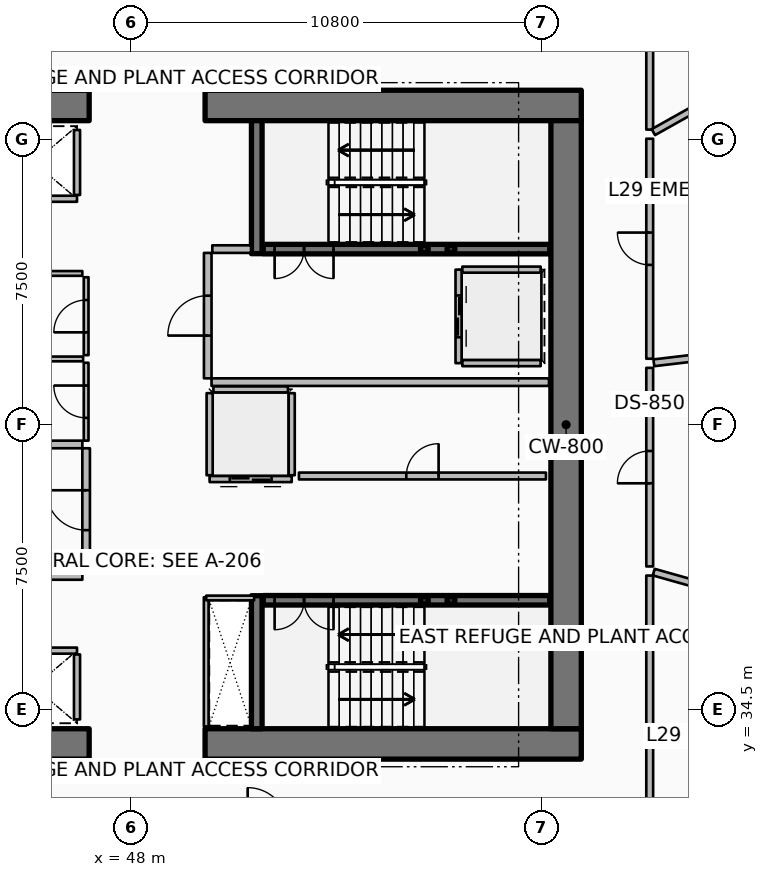
"""IFC4 building model, lengths in metres.
Left out: names, types, materials, properties, quantities, classifications, styles, units other than length and angle.
Written with IfcOpenShell. Run it as: python <this file> out.ifc"""

import sys

from ifc_helpers import new_model, si_unit, direction, frame, frame_2d, origin, origin_2d, place, context, subcontext, project, spatial, rectangle, hollow_rectangle, extrude, element, fill, save


model = new_model("IFC4")
c1 = context("Model", 3, precision=1e-05, world=origin(), true_north=direction((0.0, 1.0)))
c2 = subcontext(c1, "Body", "Model", "MODEL_VIEW")
j1 = project(units=[si_unit("LENGTHUNIT", "METRE"), si_unit("PLANEANGLEUNIT", "RADIAN")], contexts=[c1])
p1 = place(None, origin())
s1 = spatial("IfcSite", under=j1, at=p1, CompositionType="ELEMENT")
p2 = place(p1, origin())
s2 = spatial("IfcBuilding", under=s1, at=p2, CompositionType="ELEMENT")
p3 = place(p2, frame((0.0, 0.0, 116.4)))
s3 = spatial("IfcBuildingStorey", under=s2, at=p3, CompositionType="ELEMENT", Elevation=116.4)
p4 = place(p3, frame((37.0, 33.6, 0.0), z_axis=(0.0, 0.0, 1.0), x_axis=(1.0, 0.0, 0.0)))
e1 = element("IfcWall", 1, at=p4, inside=s3, PredefinedType="SHEAR", context=c2, shape_type="SweptSolid", body=[
    extrude(rectangle(XDim=9.9, YDim=0.8, at=frame_2d((4.95, 0.0))), origin(), (0.0, 0.0, 1.0), 6.6),
])
p5 = place(p3, frame((49.95, 33.6, 0.0), z_axis=(0.0, 0.0, 1.0), x_axis=(1.0, 0.0, 0.0)))
e2 = element("IfcWall", 2, at=p5, inside=s3, PredefinedType="SHEAR", context=c2, shape_type="SweptSolid", body=[
    extrude(rectangle(XDim=9.9, YDim=0.8, at=frame_2d((4.95, 0.0))), origin(), (0.0, 0.0, 1.0), 6.6),
])
p6 = place(p3, frame((37.0, 50.4, 0.0), z_axis=(0.0, 0.0, 1.0), x_axis=(1.0, 0.0, 0.0)))
e3 = element("IfcWall", 3, at=p6, inside=s3, PredefinedType="SHEAR", context=c2, shape_type="SweptSolid", body=[
    extrude(rectangle(XDim=9.9, YDim=0.8, at=frame_2d((4.95, 0.0))), origin(), (0.0, 0.0, 1.0), 6.6),
])
p7 = place(p3, frame((49.95, 50.4, 0.0), z_axis=(0.0, 0.0, 1.0), x_axis=(1.0, 0.0, 0.0)))
e4 = element("IfcWall", 4, at=p7, inside=s3, PredefinedType="SHEAR", context=c2, shape_type="SweptSolid", body=[
    extrude(rectangle(XDim=9.9, YDim=0.8, at=frame_2d((4.95, 0.0))), origin(), (0.0, 0.0, 1.0), 6.6),
])
p8 = place(p3, frame((59.45, 34.0, 0.0), z_axis=(0.0, 0.0, 1.0), x_axis=(0.0, 1.0, 0.0)))
e5 = element("IfcWall", 5, at=p8, inside=s3, PredefinedType="SHEAR", context=c2, shape_type="SweptSolid", body=[
    extrude(rectangle(XDim=16.0, YDim=0.8, at=frame_2d((8.0, 0.0))), origin(), (0.0, 0.0, 1.0), 6.6),
])
for number, where, z_axis, x_axis in (
    (6, (51.31, 46.5, 0.0), (0.0, 0.0, 1.0), (0.0, 1.0, 0.0)),
    (7, (51.31, 34.0, 0.0), (0.0, 0.0, 1.0), (0.0, 1.0, 0.0)),
):
    element("IfcWall", number, at=place(p3, frame(where, z_axis=z_axis, x_axis=x_axis)), inside=s3, PredefinedType="SHEAR", context=c2, shape_type="SweptSolid", body=[
        extrude(rectangle(XDim=3.5, YDim=0.28, at=frame_2d((1.75, 0.0))), origin(), (0.0, 0.0, 1.0), 6.6),
    ])
p9 = place(p3, frame((55.72, 46.62, 0.0), z_axis=(0.0, 0.0, 1.0), x_axis=(1.0, 0.0, 0.0)))
e8 = element("IfcColumn", 8, at=p9, inside=s3, PredefinedType="COLUMN", context=c2, shape_type="SweptSolid", body=[
    extrude(hollow_rectangle(XDim=0.2, YDim=0.2, WallThickness=0.01, InnerFilletRadius=0.01, OuterFilletRadius=0.02, at=origin_2d()), origin(), (0.0, 0.0, 1.0), 1.445),
])
p10 = place(p3, frame((56.42, 46.62, 0.0), z_axis=(0.0, 0.0, 1.0), x_axis=(1.0, 0.0, 0.0)))
e9 = element("IfcColumn", 9, at=p10, inside=s3, PredefinedType="COLUMN", context=c2, shape_type="SweptSolid", body=[
    extrude(hollow_rectangle(XDim=0.2, YDim=0.2, WallThickness=0.01, InnerFilletRadius=0.01, OuterFilletRadius=0.02, at=origin_2d()), origin(), (0.0, 0.0, 1.0), 4.745),
])
p11 = place(p3, frame((55.72, 37.38, 0.0), z_axis=(0.0, 0.0, 1.0), x_axis=(1.0, 0.0, 0.0)))
e10 = element("IfcColumn", 10, at=p11, inside=s3, PredefinedType="COLUMN", context=c2, shape_type="SweptSolid", body=[
    extrude(hollow_rectangle(XDim=0.2, YDim=0.2, WallThickness=0.01, InnerFilletRadius=0.01, OuterFilletRadius=0.02, at=origin_2d()), origin(), (0.0, 0.0, 1.0), 1.445),
])
p12 = place(p3, frame((56.42, 37.38, 0.0), z_axis=(0.0, 0.0, 1.0), x_axis=(1.0, 0.0, 0.0)))
e11 = element("IfcColumn", 11, at=p12, inside=s3, PredefinedType="COLUMN", context=c2, shape_type="SweptSolid", body=[
    extrude(hollow_rectangle(XDim=0.2, YDim=0.2, WallThickness=0.01, InnerFilletRadius=0.01, OuterFilletRadius=0.02, at=origin_2d()), origin(), (0.0, 0.0, 1.0), 4.745),
])
p13 = place(p3, frame((51.48, 46.62, 0.0), z_axis=(0.0, 0.0, 1.0), x_axis=(1.0, 0.0, 0.0)))
e12 = element("IfcWall", 12, at=p13, inside=s3, PredefinedType="SOLIDWALL", context=c2, shape_type="SweptSolid", body=[
    extrude(rectangle(XDim=7.54, YDim=0.25, at=frame_2d((3.77, 0.0))), origin(), (0.0, 0.0, 1.0), 6.28),
])
p14 = place(p13, frame((0.3, 0.0, 0.0)))
e13 = element("IfcOpeningElement", 13, at=p14, cuts=e12, PredefinedType="OPENING", context=c2, shape_type="SweptSolid", body=[
    extrude(rectangle(XDim=1.55, YDim=2.15, at=frame_2d((0.775, 1.075))), frame((0.0, 0.135, 0.0), z_axis=(0.0, -1.0, 0.0), x_axis=(1.0, 0.0, 0.0)), (0.0, 0.0, 1.0), 0.27),
])
p15 = place(p3, frame((51.48, 37.38, 0.0), z_axis=(0.0, 0.0, 1.0), x_axis=(1.0, 0.0, 0.0)))
e14 = element("IfcWall", 14, at=p15, inside=s3, PredefinedType="SOLIDWALL", context=c2, shape_type="SweptSolid", body=[
    extrude(rectangle(XDim=7.54, YDim=0.25, at=frame_2d((3.77, 0.0))), origin(), (0.0, 0.0, 1.0), 6.28),
])
p16 = place(p15, frame((0.3, 0.0, 0.0)))
e15 = element("IfcOpeningElement", 15, at=p16, cuts=e14, PredefinedType="OPENING", context=c2, shape_type="SweptSolid", body=[
    extrude(rectangle(XDim=1.55, YDim=2.15, at=frame_2d((0.775, 1.075))), frame((0.0, 0.135, 0.0), z_axis=(0.0, -1.0, 0.0), x_axis=(1.0, 0.0, 0.0)), (0.0, 0.0, 1.0), 0.27),
])
p17 = place(p3, frame((46.58, 47.945, 0.0), z_axis=(0.0, 0.0, 1.0), x_axis=(-1.0, 0.0, 0.0)))
e16 = element("IfcWall", 16, at=p17, inside=s3, PredefinedType="PARTITIONING", context=c2, shape_type="SweptSolid", body=[
    extrude(rectangle(XDim=2.26, YDim=0.16, at=frame_2d((1.13, 0.0))), origin(), (0.0, 0.0, 1.0), 6.28),
])
p18 = place(p3, frame((46.58, 48.045, 0.0), z_axis=(0.0, 0.0, 1.0), x_axis=(0.0, 1.0, 0.0)))
e17 = element("IfcWall", 17, at=p18, inside=s3, PredefinedType="PARTITIONING", context=c2, shape_type="SweptSolid", body=[
    extrude(rectangle(XDim=1.71, YDim=0.16, at=frame_2d((0.855, 0.0))), origin(), (0.0, 0.0, 1.0), 6.28),
])
p19 = place(p3, frame((44.32, 36.055, 0.0), z_axis=(0.0, 0.0, 1.0), x_axis=(1.0, 0.0, 0.0)))
e18 = element("IfcWall", 18, at=p19, inside=s3, PredefinedType="PARTITIONING", context=c2, shape_type="SweptSolid", body=[
    extrude(rectangle(XDim=2.26, YDim=0.16, at=frame_2d((1.13, 0.0))), origin(), (0.0, 0.0, 1.0), 6.28),
])
p20 = place(p3, frame((46.58, 34.245, 0.0), z_axis=(0.0, 0.0, 1.0), x_axis=(0.0, 1.0, 0.0)))
e19 = element("IfcWall", 19, at=p20, inside=s3, PredefinedType="PARTITIONING", context=c2, shape_type="SweptSolid", body=[
    extrude(rectangle(XDim=1.71, YDim=0.16, at=frame_2d((0.855, 0.0))), origin(), (0.0, 0.0, 1.0), 6.28),
])
p21 = place(p3, frame((56.62, 46.08, 0.0), z_axis=(0.0, 0.0, 1.0), x_axis=(0.0, -1.0, 0.0)))
e20 = element("IfcWall", 20, at=p21, inside=s3, PredefinedType="PARTITIONING", context=c2, shape_type="SweptSolid", body=[
    extrude(rectangle(XDim=2.46, YDim=0.16, at=frame_2d((1.23, 0.0))), origin(), (0.0, 0.0, 1.0), 6.28),
])
p22 = place(p21, frame((0.68, 0.0, 0.0)))
e21 = element("IfcOpeningElement", 21, at=p22, cuts=e20, PredefinedType="OPENING", context=c2, shape_type="SweptSolid", body=[
    extrude(rectangle(XDim=1.1, YDim=2.1, at=frame_2d((0.55, 1.05))), frame((0.0, 0.09, 0.0), z_axis=(0.0, -1.0, 0.0), x_axis=(1.0, 0.0, 0.0)), (0.0, 0.0, 1.0), 0.18),
])
for number, where, z_axis, x_axis in (
    (22, (56.72, 46.08, 0.0), (0.0, 0.0, 1.0), (1.0, 0.0, 0.0)),
    (23, (56.72, 43.62, 0.0), (0.0, 0.0, 1.0), (1.0, 0.0, 0.0)),
):
    element("IfcWall", number, at=place(p3, frame(where, z_axis=z_axis, x_axis=x_axis)), inside=s3, PredefinedType="PARTITIONING", context=c2, shape_type="SweptSolid", body=[
        extrude(rectangle(XDim=2.06, YDim=0.16, at=frame_2d((1.03, 0.0))), origin(), (0.0, 0.0, 1.0), 6.28),
    ])
p23 = place(p3, frame((52.23, 40.57, 0.0), z_axis=(0.0, 0.0, 1.0), x_axis=(-1.0, 0.0, 0.0)))
e24 = element("IfcWall", 24, at=p23, inside=s3, PredefinedType="PARTITIONING", context=c2, shape_type="SweptSolid", body=[
    extrude(rectangle(XDim=2.16, YDim=0.16, at=frame_2d((1.08, 0.0))), origin(), (0.0, 0.0, 1.0), 6.28),
])
p24 = place(p23, frame((0.53, 0.0, 0.0)))
e25 = element("IfcOpeningElement", 25, at=p24, cuts=e24, PredefinedType="OPENING", context=c2, shape_type="SweptSolid", body=[
    extrude(rectangle(XDim=1.1, YDim=2.1, at=frame_2d((0.55, 1.05))), frame((0.0, 0.09, 0.0), z_axis=(0.0, -1.0, 0.0), x_axis=(1.0, 0.0, 0.0)), (0.0, 0.0, 1.0), 0.18),
])
for number, where, z_axis, x_axis in (
    (26, (52.23, 40.67, 0.0), (0.0, 0.0, 1.0), (0.0, 1.0, 0.0)),
    (27, (50.07, 40.67, 0.0), (0.0, 0.0, 1.0), (0.0, 1.0, 0.0)),
):
    element("IfcWall", number, at=place(p3, frame(where, z_axis=z_axis, x_axis=x_axis)), inside=s3, PredefinedType="PARTITIONING", context=c2, shape_type="SweptSolid", body=[
        extrude(rectangle(XDim=2.16, YDim=0.16, at=frame_2d((1.08, 0.0))), origin(), (0.0, 0.0, 1.0), 6.28),
    ])
p25 = place(p3, frame((50.17, 42.93, 0.0), z_axis=(0.0, 0.0, 1.0), x_axis=(1.0, 0.0, 0.0)))
e28 = element("IfcWall", 28, at=p25, inside=s3, PredefinedType="PARTITIONING", context=c2, shape_type="SweptSolid", body=[
    extrude(rectangle(XDim=1.96, YDim=0.16, at=frame_2d((0.98, 0.0))), origin(), (0.0, 0.0, 1.0), 6.28),
])
p26 = place(p3, frame((52.42, 40.65, 0.0), z_axis=(0.0, 0.0, 1.0), x_axis=(1.0, 0.0, 0.0)))
e29 = element("IfcWall", 29, at=p26, inside=s3, PredefinedType="PARTITIONING", context=c2, shape_type="SweptSolid", body=[
    extrude(rectangle(XDim=6.5, YDim=0.18, at=frame_2d((3.25, 0.0))), origin(), (0.0, 0.0, 1.0), 6.28),
])
p27 = place(p26, frame((2.825, 0.0, 0.0)))
e30 = element("IfcOpeningElement", 30, at=p27, cuts=e29, PredefinedType="OPENING", context=c2, shape_type="SweptSolid", body=[
    extrude(rectangle(XDim=0.85, YDim=2.06, at=frame_2d((0.425, 1.03))), frame((0.0, 0.1, 0.0), z_axis=(0.0, -1.0, 0.0), x_axis=(1.0, 0.0, 0.0)), (0.0, 0.0, 1.0), 0.2),
])
p28 = place(p3, frame((41.35, 38.02, 0.0), z_axis=(0.0, 0.0, 1.0), x_axis=(1.0, 0.0, 0.0)))
e31 = element("IfcWall", 31, at=p28, inside=s3, PredefinedType="PARTITIONING", context=c2, shape_type="SweptSolid", body=[
    extrude(rectangle(XDim=5.37, YDim=0.2, at=frame_2d((2.685, 0.0))), origin(), (0.0, 0.0, 1.0), 6.28),
])
p29 = place(p3, frame((43.92, 41.48, 0.0), z_axis=(0.0, 0.0, 1.0), x_axis=(1.0, 0.0, 0.0)))
e32 = element("IfcWall", 32, at=p29, inside=s3, PredefinedType="PARTITIONING", context=c2, shape_type="SweptSolid", body=[
    extrude(rectangle(XDim=2.8, YDim=0.2, at=frame_2d((1.4, 0.0))), origin(), (0.0, 0.0, 1.0), 6.28),
])
p30 = place(p3, frame((46.82, 38.12, 0.0), z_axis=(0.0, 0.0, 1.0), x_axis=(0.0, 1.0, 0.0)))
e33 = element("IfcWall", 33, at=p30, inside=s3, PredefinedType="PARTITIONING", context=c2, shape_type="SweptSolid", body=[
    extrude(rectangle(XDim=3.26, YDim=0.2, at=frame_2d((1.63, 0.0))), origin(), (0.0, 0.0, 1.0), 6.28),
])
p31 = place(p30, frame((1.105, 0.0, 0.0)))
e34 = element("IfcOpeningElement", 34, at=p31, cuts=e33, PredefinedType="OPENING", context=c2, shape_type="SweptSolid", body=[
    extrude(rectangle(XDim=1.05, YDim=2.1, at=frame_2d((0.525, 1.05))), frame((0.0, 0.11, 0.0), z_axis=(0.0, -1.0, 0.0), x_axis=(1.0, 0.0, 0.0)), (0.0, 0.0, 1.0), 0.22),
])
p32 = place(p3, frame((50.12, 43.12, 0.0), z_axis=(0.0, 0.0, 1.0), x_axis=(1.0, 0.0, 0.0)))
e35 = element("IfcWall", 35, at=p32, inside=s3, PredefinedType="PARTITIONING", context=c2, shape_type="SweptSolid", body=[
    extrude(rectangle(XDim=8.88, YDim=0.2, at=frame_2d((4.44, 0.0))), origin(), (0.0, 0.0, 1.0), 6.28),
])
p33 = place(p3, frame((50.14, 46.62, 0.0), z_axis=(0.0, 0.0, 1.0), x_axis=(1.0, 0.0, 0.0)))
e36 = element("IfcWall", 36, at=p33, inside=s3, PredefinedType="PARTITIONING", context=c2, shape_type="SweptSolid", body=[
    extrude(rectangle(XDim=1.02, YDim=0.2, at=frame_2d((0.51, 0.0))), origin(), (0.0, 0.0, 1.0), 6.28),
])
p34 = place(p3, frame((50.02, 43.22, 0.0), z_axis=(0.0, 0.0, 1.0), x_axis=(0.0, 1.0, 0.0)))
e37 = element("IfcWall", 37, at=p34, inside=s3, PredefinedType="PARTITIONING", context=c2, shape_type="SweptSolid", body=[
    extrude(rectangle(XDim=3.3, YDim=0.2, at=frame_2d((1.65, 0.0))), origin(), (0.0, 0.0, 1.0), 6.28),
])
p35 = place(p34, frame((1.125, 0.0, 0.0)))
e38 = element("IfcOpeningElement", 38, at=p35, cuts=e37, PredefinedType="OPENING", context=c2, shape_type="SweptSolid", body=[
    extrude(rectangle(XDim=1.05, YDim=2.1, at=frame_2d((0.525, 1.05))), frame((0.0, 0.11, 0.0), z_axis=(0.0, -1.0, 0.0), x_axis=(1.0, 0.0, 0.0)), (0.0, 0.0, 1.0), 0.22),
])
p36 = place(p3, frame((41.36, 45.98, 0.0), z_axis=(0.0, 0.0, 1.0), x_axis=(1.0, 0.0, 0.0)))
e39 = element("IfcWall", 39, at=p36, inside=s3, PredefinedType="PARTITIONING", context=c2, shape_type="SweptSolid", body=[
    extrude(rectangle(XDim=5.36, YDim=0.125, at=frame_2d((2.68, 0.0))), origin(), (0.0, 0.0, 1.0), 5.72),
])
p37 = place(p3, frame((49.98, 34.06, 0.0), z_axis=(0.0, 0.0, 1.0), x_axis=(0.0, 1.0, 0.0)))
e40 = element("IfcWall", 40, at=p37, inside=s3, PredefinedType="PARTITIONING", context=c2, shape_type="SweptSolid", body=[
    extrude(rectangle(XDim=3.4, YDim=0.125, at=frame_2d((1.7, 0.0))), origin(), (0.0, 0.0, 1.0), 5.72),
])
p38 = place(p3, frame((49.98, 37.44, 0.0), z_axis=(0.0, 0.0, 1.0), x_axis=(1.0, 0.0, 0.0)))
e41 = element("IfcWall", 41, at=p38, inside=s3, PredefinedType="PARTITIONING", context=c2, shape_type="SweptSolid", body=[
    extrude(rectangle(XDim=1.26, YDim=0.125, at=frame_2d((0.63, 0.0))), origin(), (0.0, 0.0, 1.0), 5.72),
])
p39 = place(p3, frame((44.03, 43.73, 0.0), z_axis=(0.0, 0.0, 1.0), x_axis=(1.0, 0.0, 0.0)))
e42 = element("IfcWall", 42, at=p39, inside=s3, PredefinedType="PARTITIONING", context=c2, shape_type="SweptSolid", body=[
    extrude(rectangle(XDim=2.71, YDim=0.125, at=frame_2d((1.355, 0.0))), origin(), (0.0, 0.0, 1.0), 5.72),
])
p40 = place(p3, frame((46.82, 41.58, 0.0), z_axis=(0.0, 0.0, 1.0), x_axis=(0.0, 1.0, 0.0)))
e43 = element("IfcWall", 43, at=p40, inside=s3, PredefinedType="PARTITIONING", context=c2, shape_type="SweptSolid", body=[
    extrude(rectangle(XDim=2.05, YDim=0.125, at=frame_2d((1.025, 0.0))), origin(), (0.0, 0.0, 1.0), 5.72),
])
p41 = place(p40, frame((0.6, 0.0, 0.0)))
e44 = element("IfcOpeningElement", 44, at=p41, cuts=e43, PredefinedType="OPENING", context=c2, shape_type="SweptSolid", body=[
    extrude(rectangle(XDim=0.85, YDim=2.06, at=frame_2d((0.425, 1.03))), frame((0.0, 0.073, 0.0), z_axis=(0.0, -1.0, 0.0), x_axis=(1.0, 0.0, 0.0)), (0.0, 0.0, 1.0), 0.145),
])
p42 = place(p3, frame((46.82, 43.83, 0.0), z_axis=(0.0, 0.0, 1.0), x_axis=(0.0, 1.0, 0.0)))
e45 = element("IfcWall", 45, at=p42, inside=s3, PredefinedType="PARTITIONING", context=c2, shape_type="SweptSolid", body=[
    extrude(rectangle(XDim=2.05, YDim=0.125, at=frame_2d((1.025, 0.0))), origin(), (0.0, 0.0, 1.0), 5.72),
])
p43 = place(p42, frame((0.6, 0.0, 0.0)))
e46 = element("IfcOpeningElement", 46, at=p43, cuts=e45, PredefinedType="OPENING", context=c2, shape_type="SweptSolid", body=[
    extrude(rectangle(XDim=0.85, YDim=2.06, at=frame_2d((0.425, 1.03))), frame((0.0, 0.073, 0.0), z_axis=(0.0, -1.0, 0.0), x_axis=(1.0, 0.0, 0.0)), (0.0, 0.0, 1.0), 0.145),
])
p44 = place(p3, frame((61.65, 49.764, 0.0), z_axis=(0.0, 0.0, 1.0), x_axis=(0.0, 1.0, 0.0)))
e47 = element("IfcWall", 47, at=p44, inside=s3, PredefinedType="PARTITIONING", context=c2, shape_type="SweptSolid", body=[
    extrude(rectangle(XDim=2.716, YDim=0.18, at=frame_2d((1.358, 0.0))), origin(), (0.0, 0.0, 1.0), 5.273),
])
p45 = place(p3, frame((61.746, 49.698, 0.0), z_axis=(0.0, 0.0, 1.0), x_axis=(0.872491592103, 0.488629124908, 0.0)))
e48 = element("IfcWall", 48, at=p45, inside=s3, PredefinedType="PARTITIONING", context=c2, shape_type="SweptSolid", body=[
    extrude(rectangle(XDim=8.371, YDim=0.18, at=frame_2d((4.185, 0.0))), origin(), (0.0, 0.0, 1.0), 5.273),
])
p46 = place(p3, frame((61.65, 31.52, 0.0), z_axis=(0.0, 0.0, 1.0), x_axis=(0.0, 1.0, 0.0)))
e49 = element("IfcWall", 49, at=p46, inside=s3, PredefinedType="PARTITIONING", context=c2, shape_type="SweptSolid", body=[
    extrude(rectangle(XDim=6.51, YDim=0.18, at=frame_2d((3.255, 0.0))), origin(), (0.0, 0.0, 1.0), 2.304),
])
p47 = place(p3, frame((61.756, 38.12, 0.0), z_axis=(0.0, 0.0, 1.0), x_axis=(0.962455908165, -0.271438068147, 0.0)))
e50 = element("IfcWall", 50, at=p47, inside=s3, PredefinedType="PARTITIONING", context=c2, shape_type="SweptSolid", body=[
    extrude(rectangle(XDim=8.922, YDim=0.18, at=frame_2d((4.461, 0.0))), origin(), (0.0, 0.0, 1.0), 2.304),
])
p48 = place(p3, frame((61.65, 38.27, 0.0), z_axis=(0.0, 0.0, 1.0), x_axis=(0.0, 1.0, 0.0)))
e51 = element("IfcWall", 51, at=p48, inside=s3, PredefinedType="PARTITIONING", context=c2, shape_type="SweptSolid", body=[
    extrude(rectangle(XDim=5.225, YDim=0.18, at=frame_2d((2.613, 0.0))), origin(), (0.0, 0.0, 1.0), 2.304),
])
p49 = place(p48, frame((2.188, 0.0, 0.0)))
e52 = element("IfcOpeningElement", 52, at=p49, cuts=e51, PredefinedType="OPENING", context=c2, shape_type="SweptSolid", body=[
    extrude(rectangle(XDim=0.85, YDim=2.06, at=frame_2d((0.425, 1.03))), frame((0.0, 0.1, 0.0), z_axis=(0.0, -1.0, 0.0), x_axis=(1.0, 0.0, 0.0)), (0.0, 0.0, 1.0), 0.2),
])
p50 = place(p3, frame((61.759, 43.628, 0.0), z_axis=(0.0, 0.0, 1.0), x_axis=(0.993066783927, 0.117551531933, 0.0)))
e53 = element("IfcWall", 53, at=p50, inside=s3, PredefinedType="PARTITIONING", context=c2, shape_type="SweptSolid", body=[
    extrude(rectangle(XDim=10.27, YDim=0.18, at=frame_2d((5.135, 0.0))), origin(), (0.0, 0.0, 1.0), 5.273),
])
p51 = place(p3, frame((61.65, 43.736, 0.0), z_axis=(0.0, 0.0, 1.0), x_axis=(0.0, 1.0, 0.0)))
e54 = element("IfcWall", 54, at=p51, inside=s3, PredefinedType="PARTITIONING", context=c2, shape_type="SweptSolid", body=[
    extrude(rectangle(XDim=5.789, YDim=0.18, at=frame_2d((2.895, 0.0))), origin(), (0.0, 0.0, 1.0), 5.273),
])
p52 = place(p51, frame((2.469, 0.0, 0.0)))
e55 = element("IfcOpeningElement", 55, at=p52, cuts=e54, PredefinedType="OPENING", context=c2, shape_type="SweptSolid", body=[
    extrude(rectangle(XDim=0.85, YDim=2.06, at=frame_2d((0.425, 1.03))), frame((0.0, 0.1, 0.0), z_axis=(0.0, -1.0, 0.0), x_axis=(1.0, 0.0, 0.0)), (0.0, 0.0, 1.0), 0.2),
])
p53 = place(p14, origin())
e56 = element("IfcDoor", 56, at=p53, inside=s3, OperationType="DOUBLE_DOOR_SINGLE_SWING", PredefinedType="DOOR", context=c2, shape_type="SweptSolid", body=[
    extrude(rectangle(XDim=1.55, YDim=2.15, at=frame_2d((0.775, 1.075))), frame((0.0, 0.025, 0.0), z_axis=(0.0, -1.0, 0.0), x_axis=(1.0, 0.0, 0.0)), (0.0, 0.0, 1.0), 0.05),
])
fill(e13, e56)
p54 = place(p16, origin())
e57 = element("IfcDoor", 57, at=p54, inside=s3, OperationType="DOUBLE_DOOR_SINGLE_SWING", PredefinedType="DOOR", context=c2, shape_type="SweptSolid", body=[
    extrude(rectangle(XDim=1.55, YDim=2.15, at=frame_2d((0.775, 1.075))), frame((0.0, 0.025, 0.0), z_axis=(0.0, -1.0, 0.0), x_axis=(1.0, 0.0, 0.0)), (0.0, 0.0, 1.0), 0.05),
])
fill(e15, e57)
p55 = place(p22, origin())
e58 = element("IfcDoor", 58, at=p55, inside=s3, OperationType="DOUBLE_DOOR_SLIDING", PredefinedType="DOOR", context=c2, shape_type="SweptSolid", body=[
    extrude(rectangle(XDim=1.1, YDim=2.1, at=frame_2d((0.55, 1.05))), frame((0.0, 0.025, 0.0), z_axis=(0.0, -1.0, 0.0), x_axis=(1.0, 0.0, 0.0)), (0.0, 0.0, 1.0), 0.05),
])
fill(e21, e58)
p56 = place(p24, origin())
e59 = element("IfcDoor", 59, at=p56, inside=s3, OperationType="DOUBLE_DOOR_SLIDING", PredefinedType="DOOR", context=c2, shape_type="SweptSolid", body=[
    extrude(rectangle(XDim=1.1, YDim=2.1, at=frame_2d((0.55, 1.05))), frame((0.0, 0.025, 0.0), z_axis=(0.0, -1.0, 0.0), x_axis=(1.0, 0.0, 0.0)), (0.0, 0.0, 1.0), 0.05),
])
fill(e25, e59)
p57 = place(p27, origin())
e60 = element("IfcDoor", 60, at=p57, inside=s3, OperationType="SINGLE_SWING_RIGHT", PredefinedType="DOOR", context=c2, shape_type="SweptSolid", body=[
    extrude(rectangle(XDim=0.85, YDim=2.06, at=frame_2d((0.425, 1.03))), frame((0.0, 0.025, 0.0), z_axis=(0.0, -1.0, 0.0), x_axis=(1.0, 0.0, 0.0)), (0.0, 0.0, 1.0), 0.05),
])
fill(e30, e60)
p58 = place(p31, origin())
e61 = element("IfcDoor", 61, at=p58, inside=s3, OperationType="SINGLE_SWING_RIGHT", PredefinedType="DOOR", context=c2, shape_type="SweptSolid", body=[
    extrude(rectangle(XDim=1.05, YDim=2.1, at=frame_2d((0.525, 1.05))), frame((0.0, 0.025, 0.0), z_axis=(0.0, -1.0, 0.0), x_axis=(1.0, 0.0, 0.0)), (0.0, 0.0, 1.0), 0.05),
])
fill(e34, e61)
p59 = place(p35, origin())
e62 = element("IfcDoor", 62, at=p59, inside=s3, OperationType="SINGLE_SWING_LEFT", PredefinedType="DOOR", context=c2, shape_type="SweptSolid", body=[
    extrude(rectangle(XDim=1.05, YDim=2.1, at=frame_2d((0.525, 1.05))), frame((0.0, 0.025, 0.0), z_axis=(0.0, -1.0, 0.0), x_axis=(1.0, 0.0, 0.0)), (0.0, 0.0, 1.0), 0.05),
])
fill(e38, e62)
p60 = place(p41, origin())
e63 = element("IfcDoor", 63, at=p60, inside=s3, OperationType="SINGLE_SWING_RIGHT", PredefinedType="DOOR", context=c2, shape_type="SweptSolid", body=[
    extrude(rectangle(XDim=0.85, YDim=2.06, at=frame_2d((0.425, 1.03))), frame((0.0, 0.025, 0.0), z_axis=(0.0, -1.0, 0.0), x_axis=(1.0, 0.0, 0.0)), (0.0, 0.0, 1.0), 0.05),
])
fill(e44, e63)
p61 = place(p43, origin())
e64 = element("IfcDoor", 64, at=p61, inside=s3, OperationType="SINGLE_SWING_LEFT", PredefinedType="DOOR", context=c2, shape_type="SweptSolid", body=[
    extrude(rectangle(XDim=0.85, YDim=2.06, at=frame_2d((0.425, 1.03))), frame((0.0, 0.025, 0.0), z_axis=(0.0, -1.0, 0.0), x_axis=(1.0, 0.0, 0.0)), (0.0, 0.0, 1.0), 0.05),
])
fill(e46, e64)
p62 = place(p49, origin())
e65 = element("IfcDoor", 65, at=p62, inside=s3, OperationType="SINGLE_SWING_LEFT", PredefinedType="DOOR", context=c2, shape_type="SweptSolid", body=[
    extrude(rectangle(XDim=0.85, YDim=2.06, at=frame_2d((0.425, 1.03))), frame((0.0, 0.025, 0.0), z_axis=(0.0, -1.0, 0.0), x_axis=(1.0, 0.0, 0.0)), (0.0, 0.0, 1.0), 0.05),
])
fill(e52, e65)
p63 = place(p52, origin())
e66 = element("IfcDoor", 66, at=p63, inside=s3, OperationType="SINGLE_SWING_RIGHT", PredefinedType="DOOR", context=c2, shape_type="SweptSolid", body=[
    extrude(rectangle(XDim=0.85, YDim=2.06, at=frame_2d((0.425, 1.03))), frame((0.0, 0.025, 0.0), z_axis=(0.0, -1.0, 0.0), x_axis=(1.0, 0.0, 0.0)), (0.0, 0.0, 1.0), 0.05),
])
fill(e55, e66)
save(model, sys.argv[1])
